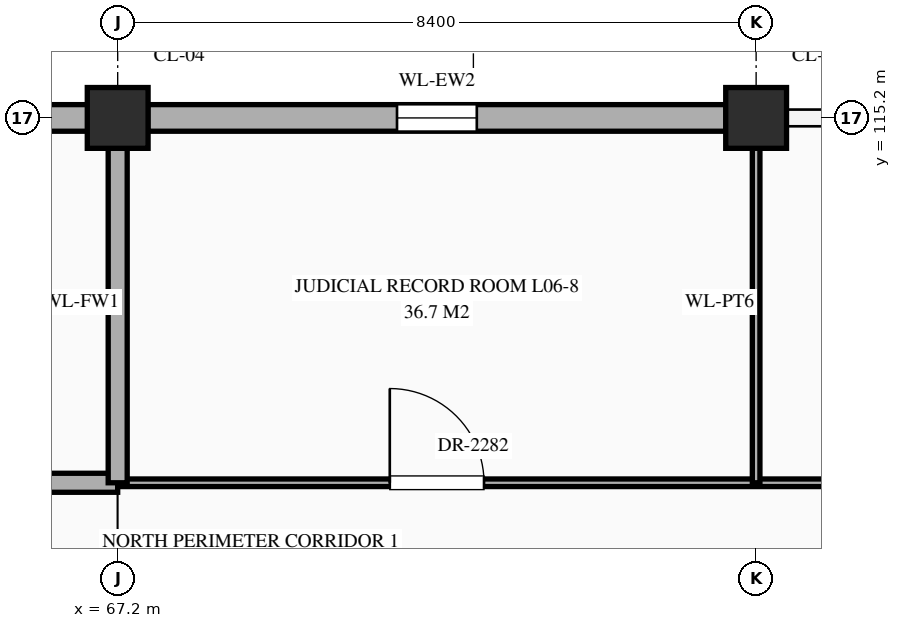
"""IFC4 building model, lengths in metres.
Left out: names, types, materials, properties, quantities, classifications, styles, units other than length and angle.
Written with IfcOpenShell. Run it as: python <this file> out.ifc"""

import sys

from ifc_helpers import new_model, si_unit, direction, frame, frame_2d, origin, origin_2d, place, context, subcontext, project, spatial, rectangle, extrude, element, fill, save


model = new_model("IFC4")
c1 = context("Model", 3, precision=1e-05, world=origin(), true_north=direction((0.0, 1.0)))
c2 = subcontext(c1, "Body", "Model", "MODEL_VIEW")
j1 = project(units=[si_unit("LENGTHUNIT", "METRE"), si_unit("PLANEANGLEUNIT", "RADIAN")], contexts=[c1])
p1 = place(None, origin())
s1 = spatial("IfcSite", under=j1, at=p1, CompositionType="ELEMENT")
p2 = place(p1, origin())
s2 = spatial("IfcBuilding", under=s1, at=p2, CompositionType="ELEMENT")
p3 = place(p2, frame((0.0, 0.0, 26.1)))
s3 = spatial("IfcBuildingStorey", under=s2, at=p3, CompositionType="ELEMENT", Elevation=26.1)
for number, where, z_axis, x_axis in (
    (1, (67.2, 115.2, 0.0), (0.0, 0.0, 1.0), (1.0, 0.0, 0.0)),
    (2, (75.6, 115.2, 0.0), (0.0, 0.0, 1.0), (1.0, 0.0, 0.0)),
):
    element("IfcColumn", number, at=place(p3, frame(where, z_axis=z_axis, x_axis=x_axis)), inside=s3, PredefinedType="COLUMN", context=c2, shape_type="SweptSolid", body=[
        extrude(rectangle(XDim=0.8, YDim=0.8, at=origin_2d()), origin(), (0.0, 0.0, 1.0), 4.5),
    ])
p4 = place(p3, frame((59.195, 115.2, 0.0), z_axis=(0.0, 0.0, 1.0), x_axis=(1.0, 0.0, 0.0)))
e3 = element("IfcWall", 3, at=p4, inside=s3, PredefinedType="STANDARD", context=c2, shape_type="SweptSolid", body=[
    extrude(rectangle(XDim=7.61, YDim=0.35, at=frame_2d((3.805, 0.0))), origin(), (0.0, 0.0, 1.0), 3.59),
])
p5 = place(p3, frame((67.595, 115.2, 0.0), z_axis=(0.0, 0.0, 1.0), x_axis=(1.0, 0.0, 0.0)))
e4 = element("IfcWall", 4, at=p5, inside=s3, PredefinedType="STANDARD", context=c2, shape_type="SweptSolid", body=[
    extrude(rectangle(XDim=7.61, YDim=0.35, at=frame_2d((3.805, 0.0))), origin(), (0.0, 0.0, 1.0), 3.59),
])
p6 = place(p5, frame((3.28, 0.0, 0.85)))
e5 = element("IfcOpeningElement", 5, at=p6, cuts=e4, PredefinedType="OPENING", context=c2, shape_type="SweptSolid", body=[
    extrude(rectangle(XDim=1.05, YDim=1.74, at=frame_2d((0.525, 0.87))), frame((0.0, 0.187, 0.0), z_axis=(0.0, -1.0, 0.0), x_axis=(1.0, 0.0, 0.0)), (0.0, 0.0, 1.0), 0.374),
])
p7 = place(p3, frame((58.8, 110.4, 0.0), z_axis=(0.0, 0.0, 1.0), x_axis=(1.0, 0.0, 0.0)))
e6 = element("IfcWall", 6, at=p7, inside=s3, PredefinedType="STANDARD", context=c2, shape_type="SweptSolid", body=[
    extrude(rectangle(XDim=8.4, YDim=0.25, at=frame_2d((4.2, 0.0))), origin(), (0.0, 0.0, 1.0), 4.24),
])
p8 = place(p7, frame((3.7, 0.0, 0.0)))
e7 = element("IfcOpeningElement", 7, at=p8, cuts=e6, PredefinedType="OPENING", context=c2, shape_type="SweptSolid", body=[
    extrude(rectangle(XDim=1.0, YDim=2.2, at=frame_2d((0.5, 1.1))), frame((0.0, 0.137, 0.0), z_axis=(0.0, -1.0, 0.0), x_axis=(1.0, 0.0, 0.0)), (0.0, 0.0, 1.0), 0.274),
])
p9 = place(p3, frame((67.2, 110.4, 0.0), z_axis=(0.0, 0.0, 1.0), x_axis=(1.0, 0.0, 0.0)))
e8 = element("IfcWall", 8, at=p9, inside=s3, PredefinedType="STANDARD", context=c2, shape_type="SweptSolid", body=[
    extrude(rectangle(XDim=33.6, YDim=0.1, at=frame_2d((16.8, 0.0))), origin(), (0.0, 0.0, 1.0), 4.24),
])
p10 = place(p9, frame((3.58, 0.0, 0.0)))
e9 = element("IfcOpeningElement", 9, at=p10, cuts=e8, PredefinedType="OPENING", context=c2, shape_type="SweptSolid", body=[
    extrude(rectangle(XDim=1.24, YDim=2.3, at=frame_2d((0.62, 1.15))), frame((0.0, 0.062, 0.0), z_axis=(0.0, -1.0, 0.0), x_axis=(1.0, 0.0, 0.0)), (0.0, 0.0, 1.0), 0.124),
])
p11 = place(p9, frame((11.96, 0.0, 0.0)))
e10 = element("IfcOpeningElement", 10, at=p11, cuts=e8, PredefinedType="OPENING", context=c2, shape_type="SweptSolid", body=[
    extrude(rectangle(XDim=1.28, YDim=2.35, at=frame_2d((0.64, 1.175))), frame((0.0, 0.062, 0.0), z_axis=(0.0, -1.0, 0.0), x_axis=(1.0, 0.0, 0.0)), (0.0, 0.0, 1.0), 0.124),
])
p12 = place(p9, frame((20.53, 0.0, 0.0)))
e11 = element("IfcOpeningElement", 11, at=p12, cuts=e8, PredefinedType="OPENING", context=c2, shape_type="SweptSolid", body=[
    extrude(rectangle(XDim=0.94, YDim=2.3, at=frame_2d((0.47, 1.15))), frame((0.0, 0.062, 0.0), z_axis=(0.0, -1.0, 0.0), x_axis=(1.0, 0.0, 0.0)), (0.0, 0.0, 1.0), 0.124),
])
p13 = place(p9, frame((28.91, 0.0, 0.0)))
e12 = element("IfcOpeningElement", 12, at=p13, cuts=e8, PredefinedType="OPENING", context=c2, shape_type="SweptSolid", body=[
    extrude(rectangle(XDim=0.98, YDim=2.35, at=frame_2d((0.49, 1.175))), frame((0.0, 0.062, 0.0), z_axis=(0.0, -1.0, 0.0), x_axis=(1.0, 0.0, 0.0)), (0.0, 0.0, 1.0), 0.124),
])
p14 = place(p3, frame((67.2, 110.4, 0.0), z_axis=(0.0, 0.0, 1.0), x_axis=(0.0, 1.0, 0.0)))
e13 = element("IfcWall", 13, at=p14, inside=s3, PredefinedType="STANDARD", context=c2, shape_type="SweptSolid", body=[
    extrude(rectangle(XDim=4.76, YDim=0.25, at=frame_2d((2.38, 0.0))), origin(), (0.0, 0.0, 1.0), 3.49),
])
p15 = place(p3, frame((75.6, 110.4, 0.0), z_axis=(0.0, 0.0, 1.0), x_axis=(0.0, 1.0, 0.0)))
e14 = element("IfcWall", 14, at=p15, inside=s3, PredefinedType="STANDARD", context=c2, shape_type="SweptSolid", body=[
    extrude(rectangle(XDim=4.76, YDim=0.1, at=frame_2d((2.38, 0.0))), origin(), (0.0, 0.0, 1.0), 3.49),
])
p16 = place(p6, origin())
e15 = element("IfcWindow", 15, at=p16, inside=s3, PartitioningType="SINGLE_PANEL", PredefinedType="WINDOW", context=c2, shape_type="SweptSolid", body=[
    extrude(rectangle(XDim=1.05, YDim=1.74, at=frame_2d((0.525, 0.87))), frame((0.0, 0.03, 0.0), z_axis=(0.0, -1.0, 0.0), x_axis=(1.0, 0.0, 0.0)), (0.0, 0.0, 1.0), 0.06),
])
fill(e5, e15)
p17 = place(p10, origin())
e16 = element("IfcDoor", 16, at=p17, inside=s3, OperationType="SINGLE_SWING_LEFT", PredefinedType="DOOR", context=c2, shape_type="SweptSolid", body=[
    extrude(rectangle(XDim=1.24, YDim=2.3, at=frame_2d((0.62, 1.15))), frame((0.0, 0.025, 0.0), z_axis=(0.0, -1.0, 0.0), x_axis=(1.0, 0.0, 0.0)), (0.0, 0.0, 1.0), 0.05),
])
fill(e9, e16)
save(model, sys.argv[1])
